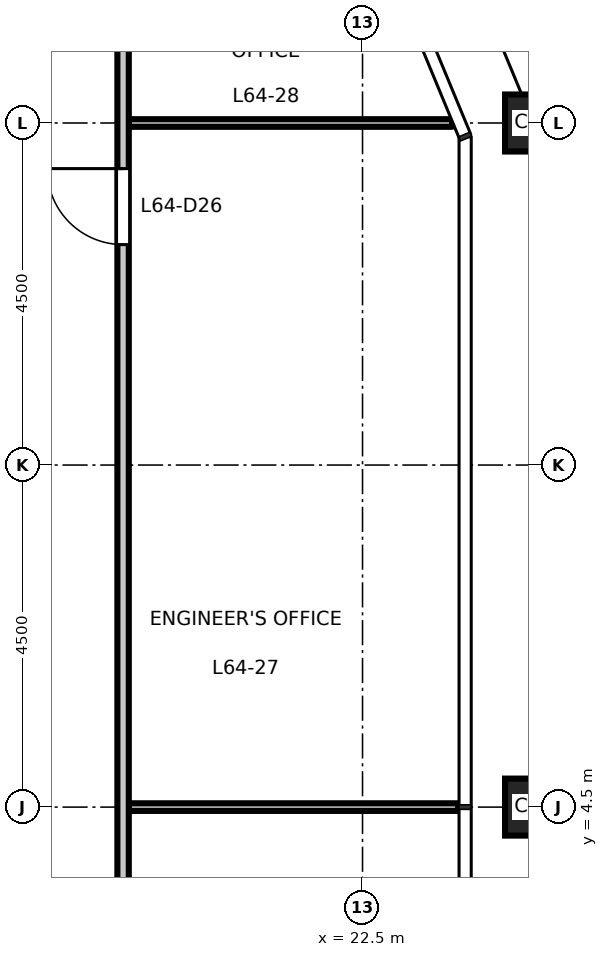
"""IFC4 building model, lengths in metres.
Left out: names, types, materials, properties, quantities, classifications, styles, units other than length and angle.
Written with IfcOpenShell. Run it as: python <this file> out.ifc"""

import sys

from ifc_helpers import new_model, si_unit, direction, frame, frame_2d, origin, origin_2d, place, context, subcontext, project, spatial, rectangle, hollow_rectangle, extrude, element, fill, save


model = new_model("IFC4")
c1 = context("Model", 3, precision=1e-05, world=origin(), true_north=direction((0.0, 1.0)))
c2 = subcontext(c1, "Body", "Model", "MODEL_VIEW")
j1 = project(units=[si_unit("LENGTHUNIT", "METRE"), si_unit("PLANEANGLEUNIT", "RADIAN")], contexts=[c1])
p1 = place(None, origin())
s1 = spatial("IfcSite", under=j1, at=p1, CompositionType="ELEMENT")
p2 = place(p1, origin())
s2 = spatial("IfcBuilding", under=s1, at=p2, CompositionType="ELEMENT")
p3 = place(p2, frame((0.0, 0.0, 298.7)))
s3 = spatial("IfcBuildingStorey", under=s2, at=p3, CompositionType="ELEMENT", Elevation=298.7)
for number, where, z_axis, x_axis in (
    (1, (24.75, 4.5, 0.0), (0.0, 0.0, 1.0), (1.0, 0.0, 0.0)),
    (2, (24.75, 13.5, 0.0), (0.0, 0.0, 1.0), (1.0, 0.0, 0.0)),
):
    element("IfcColumn", number, at=place(p3, frame(where, z_axis=z_axis, x_axis=x_axis)), inside=s3, PredefinedType="COLUMN", context=c2, shape_type="SweptSolid", body=[
        extrude(hollow_rectangle(XDim=0.75, YDim=0.75, WallThickness=0.04, at=origin_2d()), origin(), (0.0, 0.0, 1.0), 4.5),
    ])
p4 = place(p3, frame((19.425, 4.5, 0.0), z_axis=(0.0, 0.0, 1.0), x_axis=(1.0, 0.0, 0.0)))
e3 = element("IfcWall", 3, at=p4, inside=s3, PredefinedType="PARTITIONING", context=c2, shape_type="SweptSolid", body=[
    extrude(rectangle(XDim=4.335, YDim=0.1, at=frame_2d((2.167, 0.0))), origin(), (0.0, 0.0, 1.0), 4.35),
])
p5 = place(p3, frame((19.425, 13.5, 0.0), z_axis=(0.0, 0.0, 1.0), x_axis=(1.0, 0.0, 0.0)))
e4 = element("IfcWall", 4, at=p5, inside=s3, PredefinedType="PARTITIONING", context=c2, shape_type="SweptSolid", body=[
    extrude(rectangle(XDim=4.253, YDim=0.1, at=frame_2d((2.126, 0.0))), origin(), (0.0, 0.0, 1.0), 4.35),
])
p6 = place(p3, frame((19.35, -16.42, 0.0), z_axis=(0.0, 0.0, 1.0), x_axis=(0.0, 1.0, 0.0)))
e5 = element("IfcWall", 5, at=p6, inside=s3, PredefinedType="PARTITIONING", context=c2, shape_type="SweptSolid", body=[
    extrude(rectangle(XDim=32.845, YDim=0.15, at=frame_2d((16.422, 0.0))), origin(), (0.0, 0.0, 1.0), 4.35),
])
p7 = place(p6, frame((10.32, 0.0, 0.0)))
e6 = element("IfcOpeningElement", 6, at=p7, cuts=e5, PredefinedType="OPENING", context=c2, shape_type="SweptSolid", body=[
    extrude(rectangle(XDim=1.0, YDim=2.1, at=frame_2d((0.5, 1.05))), frame((0.0, 0.085, 0.0), z_axis=(0.0, -1.0, 0.0), x_axis=(1.0, 0.0, 0.0)), (0.0, 0.0, 1.0), 0.17),
])
p8 = place(p6, frame((12.57, 0.0, 0.0)))
e7 = element("IfcOpeningElement", 7, at=p8, cuts=e5, PredefinedType="OPENING", context=c2, shape_type="SweptSolid", body=[
    extrude(rectangle(XDim=1.0, YDim=2.1, at=frame_2d((0.5, 1.05))), frame((0.0, 0.085, 0.0), z_axis=(0.0, -1.0, 0.0), x_axis=(1.0, 0.0, 0.0)), (0.0, 0.0, 1.0), 0.17),
])
p9 = place(p6, frame((28.32, 0.0, 0.0)))
e8 = element("IfcOpeningElement", 8, at=p9, cuts=e5, PredefinedType="OPENING", context=c2, shape_type="SweptSolid", body=[
    extrude(rectangle(XDim=1.0, YDim=2.1, at=frame_2d((0.5, 1.05))), frame((0.0, 0.085, 0.0), z_axis=(0.0, -1.0, 0.0), x_axis=(1.0, 0.0, 0.0)), (0.0, 0.0, 1.0), 0.17),
])
p10 = place(p9, origin())
e9 = element("IfcDoor", 9, at=p10, inside=s3, OperationType="SINGLE_SWING_RIGHT", PredefinedType="DOOR", context=c2, shape_type="SweptSolid", body=[
    extrude(rectangle(XDim=1.0, YDim=2.1, at=frame_2d((0.5, 1.05))), frame((0.0, 0.025, 0.0), z_axis=(0.0, -1.0, 0.0), x_axis=(1.0, 0.0, 0.0)), (0.0, 0.0, 1.0), 0.05),
])
fill(e8, e9)
save(model, sys.argv[1])
